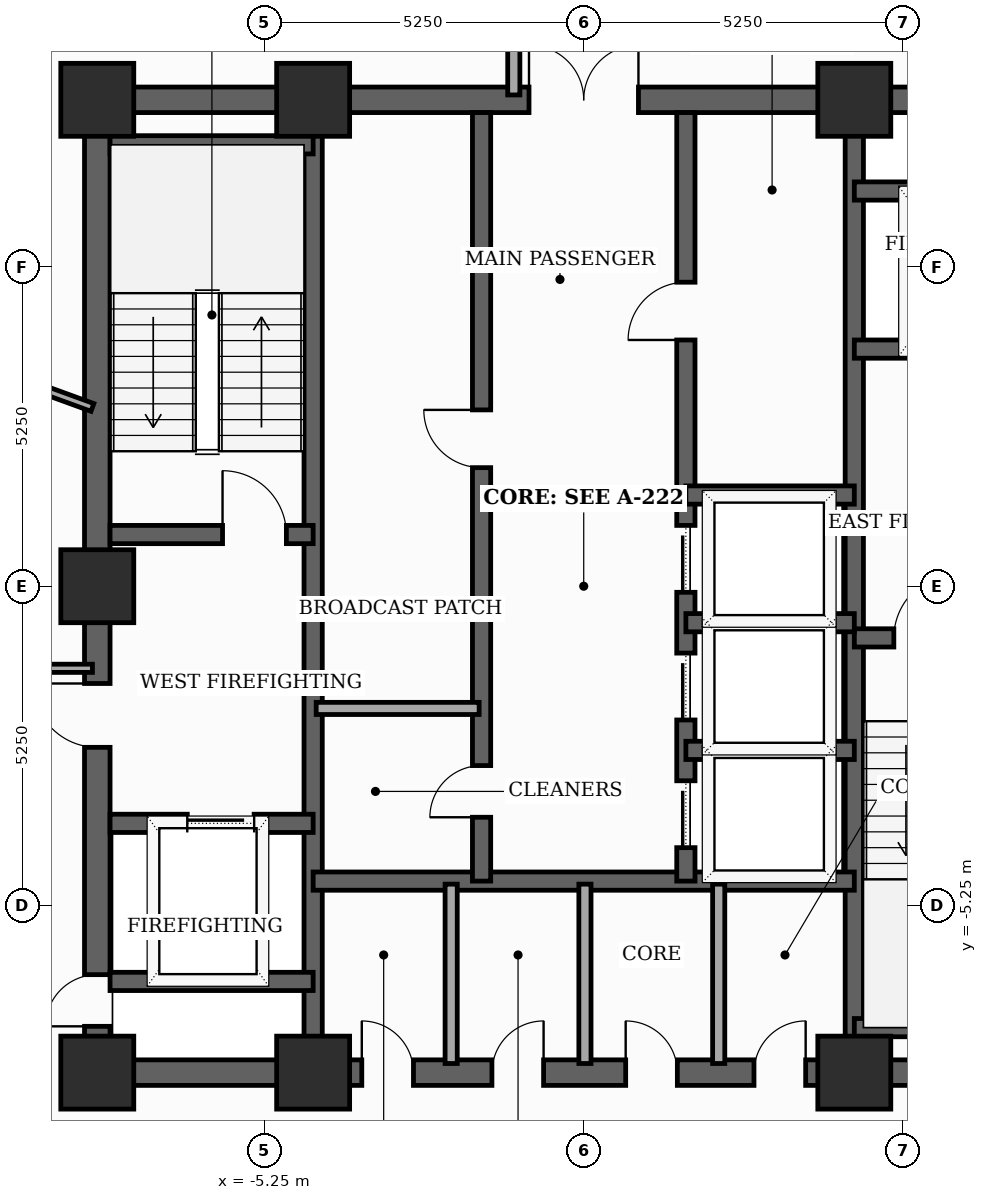
"""IFC4 building model, lengths in metres.
Left out: names, types, materials, properties, quantities, classifications, styles, units other than length and angle.
Written with IfcOpenShell. Run it as: python <this file> out.ifc"""

import sys

from ifc_helpers import new_model, si_unit, direction, frame, frame_2d, origin, origin_2d, place, context, subcontext, project, spatial, rectangle, extrude, element, fill, save


model = new_model("IFC4")
c1 = context("Model", 3, precision=1e-05, world=origin(), true_north=direction((0.0, 1.0)))
c2 = subcontext(c1, "Body", "Model", "MODEL_VIEW")
j1 = project(units=[si_unit("LENGTHUNIT", "METRE"), si_unit("PLANEANGLEUNIT", "RADIAN")], contexts=[c1])
p1 = place(None, origin())
s1 = spatial("IfcSite", under=j1, at=p1, CompositionType="ELEMENT")
p2 = place(p1, origin())
s2 = spatial("IfcBuilding", under=s1, at=p2, CompositionType="ELEMENT")
p3 = place(p2, frame((0.0, 0.0, 244.8)))
s3 = spatial("IfcBuildingStorey", under=s2, at=p3, CompositionType="ELEMENT", Elevation=244.8)
for number, where, z_axis, x_axis in (
    (1, (-8.0, -8.0, 0.0), (0.0, 0.0, 1.0), (1.0, 0.0, 0.0)),
    (2, (-4.45, -8.0, 0.0), (0.0, 0.0, 1.0), (1.0, 0.0, 0.0)),
    (3, (4.45, -8.0, 0.0), (0.0, 0.0, 1.0), (1.0, 0.0, 0.0)),
    (4, (4.45, 8.0, 0.0), (0.0, 0.0, 1.0), (1.0, 0.0, 0.0)),
    (5, (-4.45, 8.0, 0.0), (0.0, 0.0, 1.0), (1.0, 0.0, 0.0)),
    (6, (-8.0, 8.0, 0.0), (0.0, 0.0, 1.0), (1.0, 0.0, 0.0)),
    (7, (-8.0, 0.0, 0.0), (0.0, 0.0, 1.0), (1.0, 0.0, 0.0)),
):
    element("IfcColumn", number, at=place(p3, frame(where, z_axis=z_axis, x_axis=x_axis)), inside=s3, PredefinedType="COLUMN", context=c2, shape_type="SweptSolid", body=[
        extrude(rectangle(XDim=1.2, YDim=1.2, at=origin_2d()), origin(), (0.0, 0.0, 1.0), 3.7),
    ])
p4 = place(p3, frame((-8.0, -8.0, 0.0), z_axis=(0.0, 0.0, 1.0), x_axis=(0.0, 1.0, 0.0)))
e8 = element("IfcWall", 8, at=p4, inside=s3, PredefinedType="SHEAR", context=c2, shape_type="SweptSolid", body=[
    extrude(rectangle(XDim=16.0, YDim=0.42, at=frame_2d((8.0, 0.0))), origin(), (0.0, 0.0, 1.0), 3.5),
])
p5 = place(p4, frame((0.761, 0.0, 0.0)))
e9 = element("IfcOpeningElement", 9, at=p5, cuts=e8, PredefinedType="OPENING", context=c2, shape_type="SweptSolid", body=[
    extrude(rectangle(XDim=0.85, YDim=2.02, at=frame_2d((0.425, 1.01))), frame((0.0, 0.22, 0.0), z_axis=(0.0, -1.0, 0.0), x_axis=(1.0, 0.0, 0.0)), (0.0, 0.0, 1.0), 0.44),
])
p6 = place(p4, frame((5.35, 0.0, 0.0)))
e10 = element("IfcOpeningElement", 10, at=p6, cuts=e8, PredefinedType="OPENING", context=c2, shape_type="SweptSolid", body=[
    extrude(rectangle(XDim=1.05, YDim=2.15, at=frame_2d((0.525, 1.075))), frame((0.0, 0.22, 0.0), z_axis=(0.0, -1.0, 0.0), x_axis=(1.0, 0.0, 0.0)), (0.0, 0.0, 1.0), 0.44),
])
p7 = place(p3, frame((-8.0, -8.0, 0.0), z_axis=(0.0, 0.0, 1.0), x_axis=(1.0, 0.0, 0.0)))
e11 = element("IfcWall", 11, at=p7, inside=s3, PredefinedType="SHEAR", context=c2, shape_type="SweptSolid", body=[
    extrude(rectangle(XDim=16.0, YDim=0.42, at=frame_2d((8.0, 0.0))), origin(), (0.0, 0.0, 1.0), 3.5),
])
p8 = place(p7, frame((4.35, 0.0, 0.0)))
e12 = element("IfcOpeningElement", 12, at=p8, cuts=e11, PredefinedType="OPENING", context=c2, shape_type="SweptSolid", body=[
    extrude(rectangle(XDim=0.85, YDim=2.02, at=frame_2d((0.425, 1.01))), frame((0.0, 0.22, 0.0), z_axis=(0.0, -1.0, 0.0), x_axis=(1.0, 0.0, 0.0)), (0.0, 0.0, 1.0), 0.44),
])
p9 = place(p7, frame((6.49, 0.0, 0.0)))
e13 = element("IfcOpeningElement", 13, at=p9, cuts=e11, PredefinedType="OPENING", context=c2, shape_type="SweptSolid", body=[
    extrude(rectangle(XDim=0.85, YDim=2.02, at=frame_2d((0.425, 1.01))), frame((0.0, 0.22, 0.0), z_axis=(0.0, -1.0, 0.0), x_axis=(1.0, 0.0, 0.0)), (0.0, 0.0, 1.0), 0.44),
])
p10 = place(p7, frame((8.69, 0.0, 0.0)))
e14 = element("IfcOpeningElement", 14, at=p10, cuts=e11, PredefinedType="OPENING", context=c2, shape_type="SweptSolid", body=[
    extrude(rectangle(XDim=0.85, YDim=2.02, at=frame_2d((0.425, 1.01))), frame((0.0, 0.22, 0.0), z_axis=(0.0, -1.0, 0.0), x_axis=(1.0, 0.0, 0.0)), (0.0, 0.0, 1.0), 0.44),
])
p11 = place(p7, frame((10.8, 0.0, 0.0)))
e15 = element("IfcOpeningElement", 15, at=p11, cuts=e11, PredefinedType="OPENING", context=c2, shape_type="SweptSolid", body=[
    extrude(rectangle(XDim=0.85, YDim=2.02, at=frame_2d((0.425, 1.01))), frame((0.0, 0.22, 0.0), z_axis=(0.0, -1.0, 0.0), x_axis=(1.0, 0.0, 0.0)), (0.0, 0.0, 1.0), 0.44),
])
p12 = place(p3, frame((-8.0, 8.0, 0.0), z_axis=(0.0, 0.0, 1.0), x_axis=(1.0, 0.0, 0.0)))
e16 = element("IfcWall", 16, at=p12, inside=s3, PredefinedType="SHEAR", context=c2, shape_type="SweptSolid", body=[
    extrude(rectangle(XDim=16.0, YDim=0.42, at=frame_2d((8.0, 0.0))), origin(), (0.0, 0.0, 1.0), 3.5),
])
p13 = place(p12, frame((7.1, 0.0, 0.0)))
e17 = element("IfcOpeningElement", 17, at=p13, cuts=e16, PredefinedType="OPENING", context=c2, shape_type="SweptSolid", body=[
    extrude(rectangle(XDim=1.8, YDim=2.15, at=frame_2d((0.9, 1.075))), frame((0.0, 0.22, 0.0), z_axis=(0.0, -1.0, 0.0), x_axis=(1.0, 0.0, 0.0)), (0.0, 0.0, 1.0), 0.44),
])
for number, where, z_axis, x_axis in (
    (18, (-4.45, -7.79, 0.0), (0.0, 0.0, 1.0), (0.0, 1.0, 0.0)),
    (19, (4.45, -7.79, 0.0), (0.0, 0.0, 1.0), (0.0, 1.0, 0.0)),
):
    element("IfcWall", number, at=place(p3, frame(where, z_axis=z_axis, x_axis=x_axis)), inside=s3, PredefinedType="SHEAR", context=c2, shape_type="SweptSolid", body=[
        extrude(rectangle(XDim=15.58, YDim=0.3, at=frame_2d((7.79, 0.0))), origin(), (0.0, 0.0, 1.0), 3.5),
    ])
p14 = place(p3, frame((-7.79, 0.85, 0.0), z_axis=(0.0, 0.0, 1.0), x_axis=(1.0, 0.0, 0.0)))
e20 = element("IfcWall", 20, at=p14, inside=s3, PredefinedType="SHEAR", context=c2, shape_type="SweptSolid", body=[
    extrude(rectangle(XDim=3.34, YDim=0.3, at=frame_2d((1.67, 0.0))), origin(), (0.0, 0.0, 1.0), 3.5),
])
p15 = place(p14, frame((1.85, 0.0, 0.0)))
e21 = element("IfcOpeningElement", 21, at=p15, cuts=e20, PredefinedType="OPENING", context=c2, shape_type="SweptSolid", body=[
    extrude(rectangle(XDim=1.05, YDim=2.15, at=frame_2d((0.525, 1.075))), frame((0.0, 0.16, 0.0), z_axis=(0.0, -1.0, 0.0), x_axis=(1.0, 0.0, 0.0)), (0.0, 0.0, 1.0), 0.32),
])
p16 = place(p3, frame((-7.79, 7.26, 0.0), z_axis=(0.0, 0.0, 1.0), x_axis=(1.0, 0.0, 0.0)))
e22 = element("IfcWall", 22, at=p16, inside=s3, PredefinedType="SHEAR", context=c2, shape_type="SweptSolid", body=[
    extrude(rectangle(XDim=3.34, YDim=0.3, at=frame_2d((1.67, 0.0))), origin(), (0.0, 0.0, 1.0), 3.5),
])
p17 = place(p3, frame((4.45, -0.85, 0.0), z_axis=(0.0, 0.0, 1.0), x_axis=(1.0, 0.0, 0.0)))
e23 = element("IfcWall", 23, at=p17, inside=s3, PredefinedType="SHEAR", context=c2, shape_type="SweptSolid", body=[
    extrude(rectangle(XDim=3.34, YDim=0.3, at=frame_2d((1.67, 0.0))), origin(), (0.0, 0.0, 1.0), 3.5),
])
p18 = place(p17, frame((0.65, 0.0, 0.0)))
e24 = element("IfcOpeningElement", 24, at=p18, cuts=e23, PredefinedType="OPENING", context=c2, shape_type="SweptSolid", body=[
    extrude(rectangle(XDim=1.05, YDim=2.15, at=frame_2d((0.525, 1.075))), frame((0.0, 0.16, 0.0), z_axis=(0.0, -1.0, 0.0), x_axis=(1.0, 0.0, 0.0)), (0.0, 0.0, 1.0), 0.32),
])
p19 = place(p3, frame((4.45, -7.26, 0.0), z_axis=(0.0, 0.0, 1.0), x_axis=(1.0, 0.0, 0.0)))
e25 = element("IfcWall", 25, at=p19, inside=s3, PredefinedType="SHEAR", context=c2, shape_type="SweptSolid", body=[
    extrude(rectangle(XDim=3.55, YDim=0.3, at=frame_2d((1.775, 0.0))), origin(), (0.0, 0.0, 1.0), 3.5),
])
p20 = place(p3, frame((-7.79, -3.9, 0.0), z_axis=(0.0, 0.0, 1.0), x_axis=(1.0, 0.0, 0.0)))
e26 = element("IfcWall", 26, at=p20, inside=s3, PredefinedType="SHEAR", context=c2, shape_type="SweptSolid", body=[
    extrude(rectangle(XDim=3.34, YDim=0.3, at=frame_2d((1.67, 0.0))), origin(), (0.0, 0.0, 1.0), 3.5),
])
p21 = place(p20, frame((1.27, 0.0, 0.0)))
e27 = element("IfcOpeningElement", 27, at=p21, cuts=e26, PredefinedType="OPENING", context=c2, shape_type="SweptSolid", body=[
    extrude(rectangle(XDim=1.1, YDim=2.1, at=frame_2d((0.55, 1.05))), frame((0.0, 0.16, 0.0), z_axis=(0.0, -1.0, 0.0), x_axis=(1.0, 0.0, 0.0)), (0.0, 0.0, 1.0), 0.32),
])
p22 = place(p3, frame((-7.79, -6.5, 0.0), z_axis=(0.0, 0.0, 1.0), x_axis=(1.0, 0.0, 0.0)))
e28 = element("IfcWall", 28, at=p22, inside=s3, PredefinedType="SHEAR", context=c2, shape_type="SweptSolid", body=[
    extrude(rectangle(XDim=3.34, YDim=0.3, at=frame_2d((1.67, 0.0))), origin(), (0.0, 0.0, 1.0), 3.5),
])
p23 = place(p3, frame((4.45, 3.9, 0.0), z_axis=(0.0, 0.0, 1.0), x_axis=(1.0, 0.0, 0.0)))
e29 = element("IfcWall", 29, at=p23, inside=s3, PredefinedType="SHEAR", context=c2, shape_type="SweptSolid", body=[
    extrude(rectangle(XDim=3.34, YDim=0.3, at=frame_2d((1.67, 0.0))), origin(), (0.0, 0.0, 1.0), 3.5),
])
p24 = place(p23, frame((1.18, 0.0, 0.0)))
e30 = element("IfcOpeningElement", 30, at=p24, cuts=e29, PredefinedType="OPENING", context=c2, shape_type="SweptSolid", body=[
    extrude(rectangle(XDim=1.1, YDim=2.1, at=frame_2d((0.55, 1.05))), frame((0.0, 0.16, 0.0), z_axis=(0.0, -1.0, 0.0), x_axis=(1.0, 0.0, 0.0)), (0.0, 0.0, 1.0), 0.32),
])
p25 = place(p3, frame((4.45, 6.5, 0.0), z_axis=(0.0, 0.0, 1.0), x_axis=(1.0, 0.0, 0.0)))
e31 = element("IfcWall", 31, at=p25, inside=s3, PredefinedType="SHEAR", context=c2, shape_type="SweptSolid", body=[
    extrude(rectangle(XDim=3.34, YDim=0.3, at=frame_2d((1.67, 0.0))), origin(), (0.0, 0.0, 1.0), 3.5),
])
p26 = place(p3, frame((-4.45, -4.85, 0.0), z_axis=(0.0, 0.0, 1.0), x_axis=(1.0, 0.0, 0.0)))
e32 = element("IfcWall", 32, at=p26, inside=s3, PredefinedType="SHEAR", context=c2, shape_type="SweptSolid", body=[
    extrude(rectangle(XDim=8.9, YDim=0.3, at=frame_2d((4.45, 0.0))), origin(), (0.0, 0.0, 1.0), 3.5),
])
p27 = place(p3, frame((-1.68, -4.85, 0.0), z_axis=(0.0, 0.0, 1.0), x_axis=(0.0, 1.0, 0.0)))
e33 = element("IfcWall", 33, at=p27, inside=s3, PredefinedType="SHEAR", context=c2, shape_type="SweptSolid", body=[
    extrude(rectangle(XDim=12.64, YDim=0.3, at=frame_2d((6.32, 0.0))), origin(), (0.0, 0.0, 1.0), 3.5),
])
p28 = place(p27, frame((1.05, 0.0, 0.0)))
e34 = element("IfcOpeningElement", 34, at=p28, cuts=e33, PredefinedType="OPENING", context=c2, shape_type="SweptSolid", body=[
    extrude(rectangle(XDim=0.85, YDim=2.02, at=frame_2d((0.425, 1.01))), frame((0.0, 0.16, 0.0), z_axis=(0.0, -1.0, 0.0), x_axis=(1.0, 0.0, 0.0)), (0.0, 0.0, 1.0), 0.32),
])
p29 = place(p27, frame((6.8, 0.0, 0.0)))
e35 = element("IfcOpeningElement", 35, at=p29, cuts=e33, PredefinedType="OPENING", context=c2, shape_type="SweptSolid", body=[
    extrude(rectangle(XDim=0.95, YDim=2.1, at=frame_2d((0.475, 1.05))), frame((0.0, 0.16, 0.0), z_axis=(0.0, -1.0, 0.0), x_axis=(1.0, 0.0, 0.0)), (0.0, 0.0, 1.0), 0.32),
])
p30 = place(p3, frame((1.68, -4.85, 0.0), z_axis=(0.0, 0.0, 1.0), x_axis=(0.0, 1.0, 0.0)))
e36 = element("IfcWall", 36, at=p30, inside=s3, PredefinedType="SHEAR", context=c2, shape_type="SweptSolid", body=[
    extrude(rectangle(XDim=12.64, YDim=0.3, at=frame_2d((6.32, 0.0))), origin(), (0.0, 0.0, 1.0), 3.5),
])
p31 = place(p30, frame((0.55, 0.0, 0.0)))
e37 = element("IfcOpeningElement", 37, at=p31, cuts=e36, PredefinedType="OPENING", context=c2, shape_type="SweptSolid", body=[
    extrude(rectangle(XDim=1.1, YDim=2.1, at=frame_2d((0.55, 1.05))), frame((0.0, 0.16, 0.0), z_axis=(0.0, -1.0, 0.0), x_axis=(1.0, 0.0, 0.0)), (0.0, 0.0, 1.0), 0.32),
])
p32 = place(p30, frame((2.65, 0.0, 0.0)))
e38 = element("IfcOpeningElement", 38, at=p32, cuts=e36, PredefinedType="OPENING", context=c2, shape_type="SweptSolid", body=[
    extrude(rectangle(XDim=1.1, YDim=2.1, at=frame_2d((0.55, 1.05))), frame((0.0, 0.16, 0.0), z_axis=(0.0, -1.0, 0.0), x_axis=(1.0, 0.0, 0.0)), (0.0, 0.0, 1.0), 0.32),
])
p33 = place(p30, frame((4.75, 0.0, 0.0)))
e39 = element("IfcOpeningElement", 39, at=p33, cuts=e36, PredefinedType="OPENING", context=c2, shape_type="SweptSolid", body=[
    extrude(rectangle(XDim=1.1, YDim=2.1, at=frame_2d((0.55, 1.05))), frame((0.0, 0.16, 0.0), z_axis=(0.0, -1.0, 0.0), x_axis=(1.0, 0.0, 0.0)), (0.0, 0.0, 1.0), 0.32),
])
p34 = place(p30, frame((8.9, 0.0, 0.0)))
e40 = element("IfcOpeningElement", 40, at=p34, cuts=e36, PredefinedType="OPENING", context=c2, shape_type="SweptSolid", body=[
    extrude(rectangle(XDim=0.95, YDim=2.1, at=frame_2d((0.475, 1.05))), frame((0.0, 0.16, 0.0), z_axis=(0.0, -1.0, 0.0), x_axis=(1.0, 0.0, 0.0)), (0.0, 0.0, 1.0), 0.32),
])
for number, where, z_axis, x_axis in (
    (41, (1.68, 1.5, 0.0), (0.0, 0.0, 1.0), (1.0, 0.0, 0.0)),
    (42, (1.68, -2.7, 0.0), (0.0, 0.0, 1.0), (1.0, 0.0, 0.0)),
    (43, (1.68, -0.6, 0.0), (0.0, 0.0, 1.0), (1.0, 0.0, 0.0)),
):
    element("IfcWall", number, at=place(p3, frame(where, z_axis=z_axis, x_axis=x_axis)), inside=s3, PredefinedType="SHEAR", context=c2, shape_type="SweptSolid", body=[
        extrude(rectangle(XDim=2.77, YDim=0.3, at=frame_2d((1.385, 0.0))), origin(), (0.0, 0.0, 1.0), 3.5),
    ])
for number, where, z_axis, x_axis in (
    (44, (-2.18, -7.85, 0.0), (0.0, 0.0, 1.0), (0.0, 1.0, 0.0)),
    (45, (0.02, -7.85, 0.0), (0.0, 0.0, 1.0), (0.0, 1.0, 0.0)),
    (46, (2.22, -7.85, 0.0), (0.0, 0.0, 1.0), (0.0, 1.0, 0.0)),
):
    element("IfcWall", number, at=place(p3, frame(where, z_axis=z_axis, x_axis=x_axis)), inside=s3, PredefinedType="SOLIDWALL", context=c2, shape_type="SweptSolid", body=[
        extrude(rectangle(XDim=2.95, YDim=0.2, at=frame_2d((1.475, 0.0))), origin(), (0.0, 0.0, 1.0), 2.885),
    ])
p35 = place(p3, frame((-4.4, -2.01, 0.0), z_axis=(0.0, 0.0, 1.0), x_axis=(1.0, 0.0, 0.0)))
e47 = element("IfcWall", 47, at=p35, inside=s3, PredefinedType="SOLIDWALL", context=c2, shape_type="SweptSolid", body=[
    extrude(rectangle(XDim=2.68, YDim=0.2, at=frame_2d((1.34, 0.0))), origin(), (0.0, 0.0, 1.0), 3.5),
])
p36 = place(p3, frame((-8.08, -1.35, 0.0), z_axis=(0.0, 0.0, 1.0), x_axis=(-1.0, 0.0, 0.0)))
e48 = element("IfcWall", 48, at=p36, inside=s3, PredefinedType="PARTITIONING", context=c2, shape_type="SweptSolid", body=[
    extrude(rectangle(XDim=2.57, YDim=0.135, at=frame_2d((1.285, 0.0))), origin(), (0.0, 0.0, 1.0), 2.885),
])
p37 = place(p3, frame((-1.15, 10.65, 0.0), z_axis=(0.0, 0.0, 1.0), x_axis=(0.0, -1.0, 0.0)))
e49 = element("IfcWall", 49, at=p37, inside=s3, PredefinedType="SOLIDWALL", context=c2, shape_type="SweptSolid", body=[
    extrude(rectangle(XDim=2.57, YDim=0.2, at=frame_2d((1.285, 0.0))), origin(), (0.0, 0.0, 1.0), 2.885),
])
p38 = place(p3, frame((-8.08, 2.941, 0.0), z_axis=(0.0, 0.0, 1.0), x_axis=(-0.939685602892, 0.342039424216, 0.0)))
e50 = element("IfcWall", 50, at=p38, inside=s3, PredefinedType="PARTITIONING", context=c2, shape_type="SweptSolid", body=[
    extrude(rectangle(XDim=14.485, YDim=0.135, at=frame_2d((7.242, 0.0))), origin(), (0.0, 0.0, 1.0), 2.085),
])
p39 = place(p5, origin())
e51 = element("IfcDoor", 51, at=p39, inside=s3, OperationType="SINGLE_SWING_LEFT", PredefinedType="TRAPDOOR", context=c2, shape_type="SweptSolid", body=[
    extrude(rectangle(XDim=0.85, YDim=2.02, at=frame_2d((0.425, 1.01))), frame((0.0, 0.025, 0.0), z_axis=(0.0, -1.0, 0.0), x_axis=(1.0, 0.0, 0.0)), (0.0, 0.0, 1.0), 0.05),
])
fill(e9, e51)
p40 = place(p6, origin())
e52 = element("IfcDoor", 52, at=p40, inside=s3, OperationType="SINGLE_SWING_RIGHT", PredefinedType="DOOR", context=c2, shape_type="SweptSolid", body=[
    extrude(rectangle(XDim=1.05, YDim=2.15, at=frame_2d((0.525, 1.075))), frame((0.0, 0.025, 0.0), z_axis=(0.0, -1.0, 0.0), x_axis=(1.0, 0.0, 0.0)), (0.0, 0.0, 1.0), 0.05),
])
fill(e10, e52)
p41 = place(p8, origin())
e53 = element("IfcDoor", 53, at=p41, inside=s3, OperationType="SINGLE_SWING_LEFT", PredefinedType="TRAPDOOR", context=c2, shape_type="SweptSolid", body=[
    extrude(rectangle(XDim=0.85, YDim=2.02, at=frame_2d((0.425, 1.01))), frame((0.0, 0.025, 0.0), z_axis=(0.0, -1.0, 0.0), x_axis=(1.0, 0.0, 0.0)), (0.0, 0.0, 1.0), 0.05),
])
fill(e12, e53)
p42 = place(p9, origin())
e54 = element("IfcDoor", 54, at=p42, inside=s3, OperationType="SINGLE_SWING_RIGHT", PredefinedType="TRAPDOOR", context=c2, shape_type="SweptSolid", body=[
    extrude(rectangle(XDim=0.85, YDim=2.02, at=frame_2d((0.425, 1.01))), frame((0.0, 0.025, 0.0), z_axis=(0.0, -1.0, 0.0), x_axis=(1.0, 0.0, 0.0)), (0.0, 0.0, 1.0), 0.05),
])
fill(e13, e54)
p43 = place(p10, origin())
e55 = element("IfcDoor", 55, at=p43, inside=s3, OperationType="SINGLE_SWING_LEFT", PredefinedType="TRAPDOOR", context=c2, shape_type="SweptSolid", body=[
    extrude(rectangle(XDim=0.85, YDim=2.02, at=frame_2d((0.425, 1.01))), frame((0.0, 0.025, 0.0), z_axis=(0.0, -1.0, 0.0), x_axis=(1.0, 0.0, 0.0)), (0.0, 0.0, 1.0), 0.05),
])
fill(e14, e55)
p44 = place(p11, origin())
e56 = element("IfcDoor", 56, at=p44, inside=s3, OperationType="SINGLE_SWING_RIGHT", PredefinedType="TRAPDOOR", context=c2, shape_type="SweptSolid", body=[
    extrude(rectangle(XDim=0.85, YDim=2.02, at=frame_2d((0.425, 1.01))), frame((0.0, 0.025, 0.0), z_axis=(0.0, -1.0, 0.0), x_axis=(1.0, 0.0, 0.0)), (0.0, 0.0, 1.0), 0.05),
])
fill(e15, e56)
p45 = place(p13, origin())
e57 = element("IfcDoor", 57, at=p45, inside=s3, OperationType="DOUBLE_DOOR_SINGLE_SWING", PredefinedType="DOOR", context=c2, shape_type="SweptSolid", body=[
    extrude(rectangle(XDim=1.8, YDim=2.15, at=frame_2d((0.9, 1.075))), frame((0.0, 0.025, 0.0), z_axis=(0.0, -1.0, 0.0), x_axis=(1.0, 0.0, 0.0)), (0.0, 0.0, 1.0), 0.05),
])
fill(e17, e57)
p46 = place(p15, origin())
e58 = element("IfcDoor", 58, at=p46, inside=s3, OperationType="SINGLE_SWING_LEFT", PredefinedType="DOOR", context=c2, shape_type="SweptSolid", body=[
    extrude(rectangle(XDim=1.05, YDim=2.15, at=frame_2d((0.525, 1.075))), frame((0.0, 0.025, 0.0), z_axis=(0.0, -1.0, 0.0), x_axis=(1.0, 0.0, 0.0)), (0.0, 0.0, 1.0), 0.05),
])
fill(e21, e58)
p47 = place(p18, origin())
e59 = element("IfcDoor", 59, at=p47, inside=s3, OperationType="SINGLE_SWING_RIGHT", PredefinedType="DOOR", context=c2, shape_type="SweptSolid", body=[
    extrude(rectangle(XDim=1.05, YDim=2.15, at=frame_2d((0.525, 1.075))), frame((0.0, 0.025, 0.0), z_axis=(0.0, -1.0, 0.0), x_axis=(1.0, 0.0, 0.0)), (0.0, 0.0, 1.0), 0.05),
])
fill(e24, e59)
p48 = place(p21, origin())
e60 = element("IfcDoor", 60, at=p48, inside=s3, OperationType="SLIDING_TO_LEFT", PredefinedType="DOOR", context=c2, shape_type="SweptSolid", body=[
    extrude(rectangle(XDim=1.1, YDim=2.1, at=frame_2d((0.55, 1.05))), frame((0.0, 0.025, 0.0), z_axis=(0.0, -1.0, 0.0), x_axis=(1.0, 0.0, 0.0)), (0.0, 0.0, 1.0), 0.05),
])
fill(e27, e60)
p49 = place(p28, origin())
e61 = element("IfcDoor", 61, at=p49, inside=s3, OperationType="SINGLE_SWING_LEFT", PredefinedType="TRAPDOOR", context=c2, shape_type="SweptSolid", body=[
    extrude(rectangle(XDim=0.85, YDim=2.02, at=frame_2d((0.425, 1.01))), frame((0.0, 0.025, 0.0), z_axis=(0.0, -1.0, 0.0), x_axis=(1.0, 0.0, 0.0)), (0.0, 0.0, 1.0), 0.05),
])
fill(e34, e61)
p50 = place(p29, origin())
e62 = element("IfcDoor", 62, at=p50, inside=s3, OperationType="SINGLE_SWING_RIGHT", PredefinedType="DOOR", context=c2, shape_type="SweptSolid", body=[
    extrude(rectangle(XDim=0.95, YDim=2.1, at=frame_2d((0.475, 1.05))), frame((0.0, 0.025, 0.0), z_axis=(0.0, -1.0, 0.0), x_axis=(1.0, 0.0, 0.0)), (0.0, 0.0, 1.0), 0.05),
])
fill(e35, e62)
p51 = place(p31, origin())
e63 = element("IfcDoor", 63, at=p51, inside=s3, OperationType="SLIDING_TO_LEFT", PredefinedType="DOOR", context=c2, shape_type="SweptSolid", body=[
    extrude(rectangle(XDim=1.1, YDim=2.1, at=frame_2d((0.55, 1.05))), frame((0.0, 0.025, 0.0), z_axis=(0.0, -1.0, 0.0), x_axis=(1.0, 0.0, 0.0)), (0.0, 0.0, 1.0), 0.05),
])
fill(e37, e63)
p52 = place(p32, origin())
e64 = element("IfcDoor", 64, at=p52, inside=s3, OperationType="SLIDING_TO_LEFT", PredefinedType="DOOR", context=c2, shape_type="SweptSolid", body=[
    extrude(rectangle(XDim=1.1, YDim=2.1, at=frame_2d((0.55, 1.05))), frame((0.0, 0.025, 0.0), z_axis=(0.0, -1.0, 0.0), x_axis=(1.0, 0.0, 0.0)), (0.0, 0.0, 1.0), 0.05),
])
fill(e38, e64)
p53 = place(p33, origin())
e65 = element("IfcDoor", 65, at=p53, inside=s3, OperationType="SLIDING_TO_LEFT", PredefinedType="DOOR", context=c2, shape_type="SweptSolid", body=[
    extrude(rectangle(XDim=1.1, YDim=2.1, at=frame_2d((0.55, 1.05))), frame((0.0, 0.025, 0.0), z_axis=(0.0, -1.0, 0.0), x_axis=(1.0, 0.0, 0.0)), (0.0, 0.0, 1.0), 0.05),
])
fill(e39, e65)
p54 = place(p34, origin())
e66 = element("IfcDoor", 66, at=p54, inside=s3, OperationType="SINGLE_SWING_LEFT", PredefinedType="DOOR", context=c2, shape_type="SweptSolid", body=[
    extrude(rectangle(XDim=0.95, YDim=2.1, at=frame_2d((0.475, 1.05))), frame((0.0, 0.025, 0.0), z_axis=(0.0, -1.0, 0.0), x_axis=(1.0, 0.0, 0.0)), (0.0, 0.0, 1.0), 0.05),
])
fill(e40, e66)
save(model, sys.argv[1])
